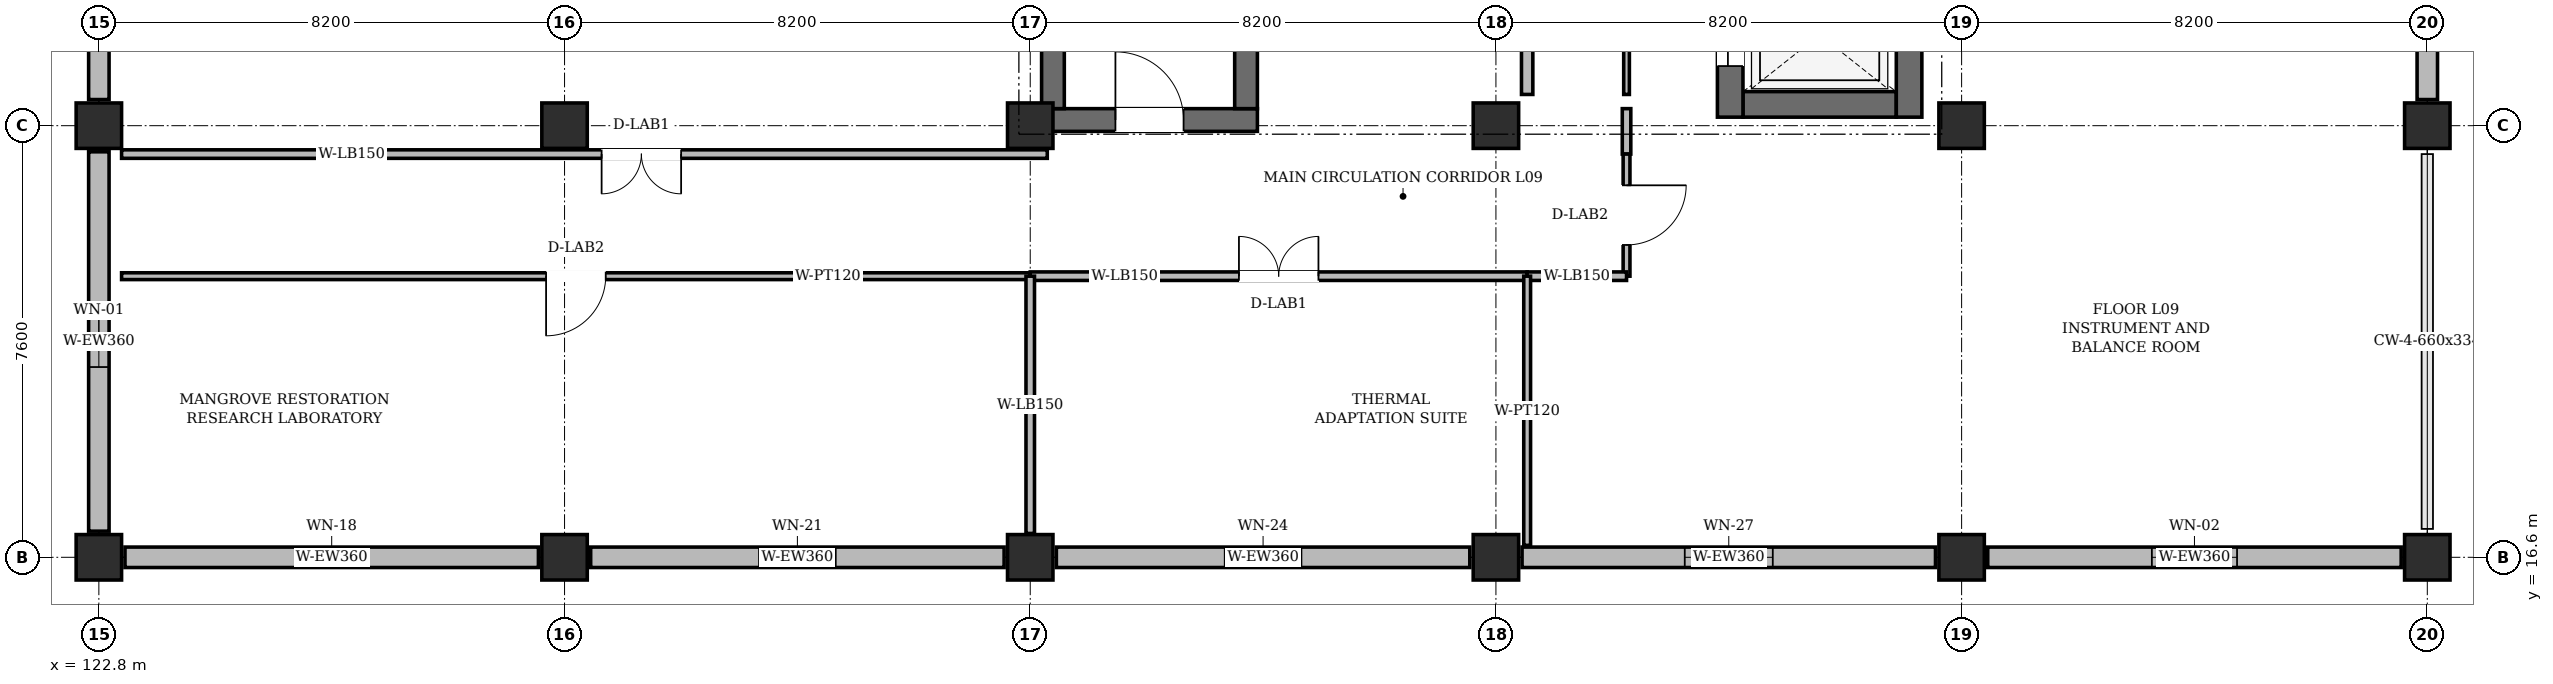
"""IFC4 building model, lengths in metres.
Left out: names, types, materials, properties, quantities, classifications, styles, units other than length and angle.
Written with IfcOpenShell. Run it as: python <this file> out.ifc"""

import sys

from ifc_helpers import new_model, si_unit, direction, frame, frame_2d, origin, origin_2d, place, context, subcontext, project, spatial, rectangle, extrude, element, fill, save


model = new_model("IFC4")
c1 = context("Model", 3, precision=1e-05, world=origin(), true_north=direction((0.0, 1.0)))
c2 = subcontext(c1, "Body", "Model", "MODEL_VIEW")
j1 = project(units=[si_unit("LENGTHUNIT", "METRE"), si_unit("PLANEANGLEUNIT", "RADIAN")], contexts=[c1])
p1 = place(None, origin())
s1 = spatial("IfcSite", under=j1, at=p1, CompositionType="ELEMENT")
p2 = place(p1, origin())
s2 = spatial("IfcBuilding", under=s1, at=p2, CompositionType="ELEMENT")
p3 = place(p2, frame((0.0, 0.0, 40.8)))
s3 = spatial("IfcBuildingStorey", under=s2, at=p3, CompositionType="ELEMENT", Elevation=40.8)
for number, where, z_axis, x_axis in (
    (1, (122.8, 16.6, 0.0), (0.0, 0.0, 1.0), (1.0, 0.0, 0.0)),
    (2, (122.8, 24.2, 0.0), (0.0, 0.0, 1.0), (1.0, 0.0, 0.0)),
    (3, (131.0, 16.6, 0.0), (0.0, 0.0, 1.0), (1.0, 0.0, 0.0)),
    (4, (131.0, 24.2, 0.0), (0.0, 0.0, 1.0), (1.0, 0.0, 0.0)),
    (5, (139.2, 16.6, 0.0), (0.0, 0.0, 1.0), (1.0, 0.0, 0.0)),
    (6, (139.2, 24.2, 0.0), (0.0, 0.0, 1.0), (1.0, 0.0, 0.0)),
    (7, (147.4, 16.6, 0.0), (0.0, 0.0, 1.0), (1.0, 0.0, 0.0)),
    (8, (147.4, 24.2, 0.0), (0.0, 0.0, 1.0), (1.0, 0.0, 0.0)),
    (9, (155.6, 16.6, 0.0), (0.0, 0.0, 1.0), (1.0, 0.0, 0.0)),
    (10, (155.6, 24.2, 0.0), (0.0, 0.0, 1.0), (1.0, 0.0, 0.0)),
    (11, (163.8, 16.6, 0.0), (0.0, 0.0, 1.0), (1.0, 0.0, 0.0)),
    (12, (163.8, 24.2, 0.0), (0.0, 0.0, 1.0), (1.0, 0.0, 0.0)),
):
    element("IfcColumn", number, at=place(p3, frame(where, z_axis=z_axis, x_axis=x_axis)), inside=s3, PredefinedType="COLUMN", context=c2, shape_type="SweptSolid", body=[
        extrude(rectangle(XDim=0.8, YDim=0.8, at=origin_2d()), origin(), (0.0, 0.0, 1.0), 3.94),
    ])
p4 = place(p3, frame((123.26, 16.6, 0.0), z_axis=(0.0, 0.0, 1.0), x_axis=(1.0, 0.0, 0.0)))
e13 = element("IfcWall", 13, at=p4, inside=s3, PredefinedType="SOLIDWALL", context=c2, shape_type="SweptSolid", body=[
    extrude(rectangle(XDim=7.28, YDim=0.36, at=frame_2d((3.64, 0.0))), origin(), (0.0, 0.0, 1.0), 3.325),
])
p5 = place(p4, frame((3.065, 0.0, 0.95)))
e14 = element("IfcOpeningElement", 14, at=p5, cuts=e13, PredefinedType="OPENING", context=c2, shape_type="SweptSolid", body=[
    extrude(rectangle(XDim=1.15, YDim=1.5, at=frame_2d((0.575, 0.75))), frame((0.0, 0.192, 0.0), z_axis=(0.0, -1.0, 0.0), x_axis=(1.0, 0.0, 0.0)), (0.0, 0.0, 1.0), 0.384),
])
p6 = place(p3, frame((131.46, 16.6, 0.0), z_axis=(0.0, 0.0, 1.0), x_axis=(1.0, 0.0, 0.0)))
e15 = element("IfcWall", 15, at=p6, inside=s3, PredefinedType="SOLIDWALL", context=c2, shape_type="SweptSolid", body=[
    extrude(rectangle(XDim=7.28, YDim=0.36, at=frame_2d((3.64, 0.0))), origin(), (0.0, 0.0, 1.0), 3.325),
])
p7 = place(p6, frame((2.965, 0.0, 0.95)))
e16 = element("IfcOpeningElement", 16, at=p7, cuts=e15, PredefinedType="OPENING", context=c2, shape_type="SweptSolid", body=[
    extrude(rectangle(XDim=1.35, YDim=1.25, at=frame_2d((0.675, 0.625))), frame((0.0, 0.192, 0.0), z_axis=(0.0, -1.0, 0.0), x_axis=(1.0, 0.0, 0.0)), (0.0, 0.0, 1.0), 0.384),
])
p8 = place(p3, frame((139.66, 16.6, 0.0), z_axis=(0.0, 0.0, 1.0), x_axis=(1.0, 0.0, 0.0)))
e17 = element("IfcWall", 17, at=p8, inside=s3, PredefinedType="SOLIDWALL", context=c2, shape_type="SweptSolid", body=[
    extrude(rectangle(XDim=7.28, YDim=0.36, at=frame_2d((3.64, 0.0))), origin(), (0.0, 0.0, 1.0), 3.325),
])
p9 = place(p8, frame((2.965, 0.0, 0.95)))
e18 = element("IfcOpeningElement", 18, at=p9, cuts=e17, PredefinedType="OPENING", context=c2, shape_type="SweptSolid", body=[
    extrude(rectangle(XDim=1.35, YDim=2.05, at=frame_2d((0.675, 1.025))), frame((0.0, 0.192, 0.0), z_axis=(0.0, -1.0, 0.0), x_axis=(1.0, 0.0, 0.0)), (0.0, 0.0, 1.0), 0.384),
])
p10 = place(p3, frame((147.86, 16.6, 0.0), z_axis=(0.0, 0.0, 1.0), x_axis=(1.0, 0.0, 0.0)))
e19 = element("IfcWall", 19, at=p10, inside=s3, PredefinedType="SOLIDWALL", context=c2, shape_type="SweptSolid", body=[
    extrude(rectangle(XDim=7.28, YDim=0.36, at=frame_2d((3.64, 0.0))), origin(), (0.0, 0.0, 1.0), 3.325),
])
p11 = place(p10, frame((2.865, 0.0, 0.95)))
e20 = element("IfcOpeningElement", 20, at=p11, cuts=e19, PredefinedType="OPENING", context=c2, shape_type="SweptSolid", body=[
    extrude(rectangle(XDim=1.55, YDim=1.75, at=frame_2d((0.775, 0.875))), frame((0.0, 0.192, 0.0), z_axis=(0.0, -1.0, 0.0), x_axis=(1.0, 0.0, 0.0)), (0.0, 0.0, 1.0), 0.384),
])
p12 = place(p3, frame((156.06, 16.6, 0.0), z_axis=(0.0, 0.0, 1.0), x_axis=(1.0, 0.0, 0.0)))
e21 = element("IfcWall", 21, at=p12, inside=s3, PredefinedType="SOLIDWALL", context=c2, shape_type="SweptSolid", body=[
    extrude(rectangle(XDim=7.28, YDim=0.36, at=frame_2d((3.64, 0.0))), origin(), (0.0, 0.0, 1.0), 3.325),
])
p13 = place(p12, frame((2.89, 0.0, 0.95)))
e22 = element("IfcOpeningElement", 22, at=p13, cuts=e21, PredefinedType="OPENING", context=c2, shape_type="SweptSolid", body=[
    extrude(rectangle(XDim=1.5, YDim=2.1, at=frame_2d((0.75, 1.05))), frame((0.0, 0.192, 0.0), z_axis=(0.0, -1.0, 0.0), x_axis=(1.0, 0.0, 0.0)), (0.0, 0.0, 1.0), 0.384),
])
p14 = place(p3, frame((163.8, 24.66, 0.0), z_axis=(0.0, 0.0, 1.0), x_axis=(0.0, 1.0, 0.0)))
e23 = element("IfcWall", 23, at=p14, inside=s3, PredefinedType="SOLIDWALL", context=c2, shape_type="SweptSolid", body=[
    extrude(rectangle(XDim=6.68, YDim=0.36, at=frame_2d((3.34, 0.0))), origin(), (0.0, 0.0, 1.0), 3.325),
])
p15 = place(p14, frame((2.665, 0.0, 0.95)))
e24 = element("IfcOpeningElement", 24, at=p15, cuts=e23, PredefinedType="OPENING", context=c2, shape_type="SweptSolid", body=[
    extrude(rectangle(XDim=1.35, YDim=1.5, at=frame_2d((0.675, 0.75))), frame((0.0, 0.192, 0.0), z_axis=(0.0, -1.0, 0.0), x_axis=(1.0, 0.0, 0.0)), (0.0, 0.0, 1.0), 0.384),
])
p16 = place(p3, frame((122.8, 31.34, 0.0), z_axis=(0.0, 0.0, 1.0), x_axis=(0.0, -1.0, 0.0)))
e25 = element("IfcWall", 25, at=p16, inside=s3, PredefinedType="SOLIDWALL", context=c2, shape_type="SweptSolid", body=[
    extrude(rectangle(XDim=6.68, YDim=0.36, at=frame_2d((3.34, 0.0))), origin(), (0.0, 0.0, 1.0), 3.325),
])
p17 = place(p16, frame((2.565, 0.0, 0.95)))
e26 = element("IfcOpeningElement", 26, at=p17, cuts=e25, PredefinedType="OPENING", context=c2, shape_type="SweptSolid", body=[
    extrude(rectangle(XDim=1.55, YDim=1.5, at=frame_2d((0.775, 0.75))), frame((0.0, 0.192, 0.0), z_axis=(0.0, -1.0, 0.0), x_axis=(1.0, 0.0, 0.0)), (0.0, 0.0, 1.0), 0.384),
])
p18 = place(p3, frame((122.8, 23.74, 0.0), z_axis=(0.0, 0.0, 1.0), x_axis=(0.0, -1.0, 0.0)))
e27 = element("IfcWall", 27, at=p18, inside=s3, PredefinedType="SOLIDWALL", context=c2, shape_type="SweptSolid", body=[
    extrude(rectangle(XDim=6.68, YDim=0.36, at=frame_2d((3.34, 0.0))), origin(), (0.0, 0.0, 1.0), 3.325),
])
p19 = place(p18, frame((2.89, 0.0, 0.95)))
e28 = element("IfcOpeningElement", 28, at=p19, cuts=e27, PredefinedType="OPENING", context=c2, shape_type="SweptSolid", body=[
    extrude(rectangle(XDim=0.9, YDim=2.1, at=frame_2d((0.45, 1.05))), frame((0.0, 0.192, 0.0), z_axis=(0.0, -1.0, 0.0), x_axis=(1.0, 0.0, 0.0)), (0.0, 0.0, 1.0), 0.384),
])
p20 = place(p3, frame((139.4, 24.3, 0.0), z_axis=(0.0, 0.0, 1.0), x_axis=(1.0, 0.0, 0.0)))
e29 = element("IfcWall", 29, at=p20, inside=s3, PredefinedType="SHEAR", context=c2, shape_type="SweptSolid", body=[
    extrude(rectangle(XDim=3.8, YDim=0.4, at=frame_2d((1.9, 0.0))), origin(), (0.0, 0.0, 1.0), 3.94),
])
p21 = place(p20, frame((1.3, 0.0, 0.0)))
e30 = element("IfcOpeningElement", 30, at=p21, cuts=e29, PredefinedType="OPENING", context=c2, shape_type="SweptSolid", body=[
    extrude(rectangle(XDim=1.2, YDim=2.2, at=frame_2d((0.6, 1.1))), frame((0.0, 0.212, 0.0), z_axis=(0.0, -1.0, 0.0), x_axis=(1.0, 0.0, 0.0)), (0.0, 0.0, 1.0), 0.424),
])
for number, where, z_axis, x_axis in (
    (31, (139.6, 24.5, 0.0), (0.0, 0.0, 1.0), (0.0, 1.0, 0.0)),
    (32, (143.0, 24.5, 0.0), (0.0, 0.0, 1.0), (0.0, 1.0, 0.0)),
):
    element("IfcWall", number, at=place(p3, frame(where, z_axis=z_axis, x_axis=x_axis)), inside=s3, PredefinedType="SHEAR", context=c2, shape_type="SweptSolid", body=[
        extrude(rectangle(XDim=7.0, YDim=0.4, at=frame_2d((3.5, 0.0))), origin(), (0.0, 0.0, 1.0), 3.94),
    ])
p22 = place(p3, frame((151.75, 24.575, 0.0), z_axis=(0.0, 0.0, 1.0), x_axis=(1.0, 0.0, 0.0)))
e33 = element("IfcWall", 33, at=p22, inside=s3, PredefinedType="SHEAR", context=c2, shape_type="SweptSolid", body=[
    extrude(rectangle(XDim=2.7, YDim=0.45, at=frame_2d((1.35, 0.0))), origin(), (0.0, 0.0, 1.0), 3.94),
])
p23 = place(p3, frame((151.525, 24.35, 0.0), z_axis=(0.0, 0.0, 1.0), x_axis=(0.0, 1.0, 0.0)))
e34 = element("IfcWall", 34, at=p23, inside=s3, PredefinedType="SHEAR", context=c2, shape_type="SweptSolid", body=[
    extrude(rectangle(XDim=2.9, YDim=0.45, at=frame_2d((1.45, 0.0))), origin(), (0.0, 0.0, 1.0), 3.94),
])
p24 = place(p23, frame((0.9, 0.0, 0.0)))
e35 = element("IfcOpeningElement", 35, at=p24, cuts=e34, PredefinedType="OPENING", context=c2, shape_type="SweptSolid", body=[
    extrude(rectangle(XDim=1.1, YDim=2.2, at=frame_2d((0.55, 1.1))), frame((0.0, 0.237, 0.0), z_axis=(0.0, -1.0, 0.0), x_axis=(1.0, 0.0, 0.0)), (0.0, 0.0, 1.0), 0.474),
])
p25 = place(p3, frame((154.675, 24.35, 0.0), z_axis=(0.0, 0.0, 1.0), x_axis=(0.0, 1.0, 0.0)))
e36 = element("IfcWall", 36, at=p25, inside=s3, PredefinedType="SHEAR", context=c2, shape_type="SweptSolid", body=[
    extrude(rectangle(XDim=2.9, YDim=0.45, at=frame_2d((1.45, 0.0))), origin(), (0.0, 0.0, 1.0), 3.94),
])
p26 = place(p3, frame((147.95, 31.75, 0.0), z_axis=(0.0, 0.0, 1.0), x_axis=(0.0, -1.0, 0.0)))
e37 = element("IfcWall", 37, at=p26, inside=s3, PredefinedType="PARTITIONING", context=c2, shape_type="SweptSolid", body=[
    extrude(rectangle(XDim=7.0, YDim=0.2, at=frame_2d((3.5, 0.0))), origin(), (0.0, 0.0, 1.0), 3.805),
])
p27 = place(p26, frame((2.75, 0.0, 0.0)))
e38 = element("IfcOpeningElement", 38, at=p27, cuts=e37, PredefinedType="OPENING", context=c2, shape_type="SweptSolid", body=[
    extrude(rectangle(XDim=1.5, YDim=2.2, at=frame_2d((0.75, 1.1))), frame((0.0, 0.112, 0.0), z_axis=(0.0, -1.0, 0.0), x_axis=(1.0, 0.0, 0.0)), (0.0, 0.0, 1.0), 0.224),
])
p28 = place(p3, frame((149.7, 24.75, 0.0), z_axis=(0.0, 0.0, 1.0), x_axis=(0.0, 1.0, 0.0)))
e39 = element("IfcWall", 39, at=p28, inside=s3, PredefinedType="PARTITIONING", context=c2, shape_type="SweptSolid", body=[
    extrude(rectangle(XDim=11.3, YDim=0.1, at=frame_2d((5.65, 0.0))), origin(), (0.0, 0.0, 1.0), 3.805),
])
p29 = place(p28, frame((4.75, 0.0, 0.0)))
e40 = element("IfcOpeningElement", 40, at=p29, cuts=e39, PredefinedType="OPENING", context=c2, shape_type="SweptSolid", body=[
    extrude(rectangle(XDim=1.8, YDim=2.4, at=frame_2d((0.9, 1.2))), frame((0.0, 0.062, 0.0), z_axis=(0.0, -1.0, 0.0), x_axis=(1.0, 0.0, 0.0)), (0.0, 0.0, 1.0), 0.124),
])
p30 = place(p3, frame((139.2, 21.55, 0.0), z_axis=(0.0, 0.0, 1.0), x_axis=(-1.0, 0.0, 0.0)))
e41 = element("IfcWall", 41, at=p30, inside=s3, PredefinedType="PARTITIONING", context=c2, shape_type="SweptSolid", body=[
    extrude(rectangle(XDim=16.0, YDim=0.12, at=frame_2d((8.0, 0.0))), origin(), (0.0, 0.0, 1.0), 3.585),
])
p31 = place(p30, frame((7.475, 0.0, 0.0)))
e42 = element("IfcOpeningElement", 42, at=p31, cuts=e41, PredefinedType="OPENING", context=c2, shape_type="SweptSolid", body=[
    extrude(rectangle(XDim=1.05, YDim=2.2, at=frame_2d((0.525, 1.1))), frame((0.0, 0.072, 0.0), z_axis=(0.0, -1.0, 0.0), x_axis=(1.0, 0.0, 0.0)), (0.0, 0.0, 1.0), 0.144),
])
p32 = place(p3, frame((147.95, 21.55, 0.0), z_axis=(0.0, 0.0, 1.0), x_axis=(-1.0, 0.0, 0.0)))
e43 = element("IfcWall", 43, at=p32, inside=s3, PredefinedType="PARTITIONING", context=c2, shape_type="SweptSolid", body=[
    extrude(rectangle(XDim=8.75, YDim=0.15, at=frame_2d((4.375, 0.0))), origin(), (0.0, 0.0, 1.0), 3.515),
])
p33 = place(p32, frame((3.675, 0.0, 0.0)))
e44 = element("IfcOpeningElement", 44, at=p33, cuts=e43, PredefinedType="OPENING", context=c2, shape_type="SweptSolid", body=[
    extrude(rectangle(XDim=1.4, YDim=2.2, at=frame_2d((0.7, 1.1))), frame((0.0, 0.087, 0.0), z_axis=(0.0, -1.0, 0.0), x_axis=(1.0, 0.0, 0.0)), (0.0, 0.0, 1.0), 0.174),
])
p34 = place(p3, frame((149.7, 24.5, 0.0), z_axis=(0.0, 0.0, 1.0), x_axis=(0.0, -1.0, 0.0)))
e45 = element("IfcWall", 45, at=p34, inside=s3, PredefinedType="PARTITIONING", context=c2, shape_type="SweptSolid", body=[
    extrude(rectangle(XDim=0.8, YDim=0.15, at=frame_2d((0.4, 0.0))), origin(), (0.0, 0.0, 1.0), 3.805),
])
p35 = place(p3, frame((149.7, 23.7, 0.0), z_axis=(0.0, 0.0, 1.0), x_axis=(0.0, -1.0, 0.0)))
e46 = element("IfcWall", 46, at=p35, inside=s3, PredefinedType="PARTITIONING", context=c2, shape_type="SweptSolid", body=[
    extrude(rectangle(XDim=2.15, YDim=0.12, at=frame_2d((1.075, 0.0))), origin(), (0.0, 0.0, 1.0), 3.805),
])
p36 = place(p35, frame((0.55, 0.0, 0.0)))
e47 = element("IfcOpeningElement", 47, at=p36, cuts=e46, PredefinedType="OPENING", context=c2, shape_type="SweptSolid", body=[
    extrude(rectangle(XDim=1.05, YDim=2.2, at=frame_2d((0.525, 1.1))), frame((0.0, 0.072, 0.0), z_axis=(0.0, -1.0, 0.0), x_axis=(1.0, 0.0, 0.0)), (0.0, 0.0, 1.0), 0.144),
])
p37 = place(p3, frame((149.7, 21.55, 0.0), z_axis=(0.0, 0.0, 1.0), x_axis=(-1.0, 0.0, 0.0)))
e48 = element("IfcWall", 48, at=p37, inside=s3, PredefinedType="PARTITIONING", context=c2, shape_type="SweptSolid", body=[
    extrude(rectangle(XDim=1.75, YDim=0.15, at=frame_2d((0.875, 0.0))), origin(), (0.0, 0.0, 1.0), 3.515),
])
p38 = place(p3, frame((123.2, 23.7, 0.0), z_axis=(0.0, 0.0, 1.0), x_axis=(1.0, 0.0, 0.0)))
e49 = element("IfcWall", 49, at=p38, inside=s3, PredefinedType="PARTITIONING", context=c2, shape_type="SweptSolid", body=[
    extrude(rectangle(XDim=16.3, YDim=0.15, at=frame_2d((8.15, 0.0))), origin(), (0.0, 0.0, 1.0), 3.805),
])
p39 = place(p38, frame((8.453, 0.0, 0.0)))
e50 = element("IfcOpeningElement", 50, at=p39, cuts=e49, PredefinedType="OPENING", context=c2, shape_type="SweptSolid", body=[
    extrude(rectangle(XDim=1.4, YDim=2.2, at=frame_2d((0.7, 1.1))), frame((0.0, 0.087, 0.0), z_axis=(0.0, -1.0, 0.0), x_axis=(1.0, 0.0, 0.0)), (0.0, 0.0, 1.0), 0.174),
])
p40 = place(p3, frame((139.2, 21.55, 0.0), z_axis=(0.0, 0.0, 1.0), x_axis=(0.0, -1.0, 0.0)))
e51 = element("IfcWall", 51, at=p40, inside=s3, PredefinedType="PARTITIONING", context=c2, shape_type="SweptSolid", body=[
    extrude(rectangle(XDim=4.53, YDim=0.15, at=frame_2d((2.265, 0.0))), origin(), (0.0, 0.0, 1.0), 3.275),
])
p41 = place(p3, frame((147.95, 21.55, 0.0), z_axis=(0.0, 0.0, 1.0), x_axis=(0.0, -1.0, 0.0)))
e52 = element("IfcWall", 52, at=p41, inside=s3, PredefinedType="PARTITIONING", context=c2, shape_type="SweptSolid", body=[
    extrude(rectangle(XDim=4.74, YDim=0.12, at=frame_2d((2.37, 0.0))), origin(), (0.0, 0.0, 1.0), 3.805),
])
p42 = place(p5, origin())
e53 = element("IfcWindow", 53, at=p42, inside=s3, PartitioningType="SINGLE_PANEL", PredefinedType="WINDOW", context=c2, shape_type="SweptSolid", body=[
    extrude(rectangle(XDim=1.15, YDim=1.5, at=frame_2d((0.575, 0.75))), frame((0.0, 0.03, 0.0), z_axis=(0.0, -1.0, 0.0), x_axis=(1.0, 0.0, 0.0)), (0.0, 0.0, 1.0), 0.06),
])
fill(e14, e53)
p43 = place(p7, origin())
e54 = element("IfcWindow", 54, at=p43, inside=s3, PartitioningType="SINGLE_PANEL", PredefinedType="WINDOW", context=c2, shape_type="SweptSolid", body=[
    extrude(rectangle(XDim=1.35, YDim=1.25, at=frame_2d((0.675, 0.625))), frame((0.0, 0.03, 0.0), z_axis=(0.0, -1.0, 0.0), x_axis=(1.0, 0.0, 0.0)), (0.0, 0.0, 1.0), 0.06),
])
fill(e16, e54)
p44 = place(p9, origin())
e55 = element("IfcWindow", 55, at=p44, inside=s3, PartitioningType="SINGLE_PANEL", PredefinedType="WINDOW", context=c2, shape_type="SweptSolid", body=[
    extrude(rectangle(XDim=1.35, YDim=2.05, at=frame_2d((0.675, 1.025))), frame((0.0, 0.03, 0.0), z_axis=(0.0, -1.0, 0.0), x_axis=(1.0, 0.0, 0.0)), (0.0, 0.0, 1.0), 0.06),
])
fill(e18, e55)
p45 = place(p11, origin())
e56 = element("IfcWindow", 56, at=p45, inside=s3, PartitioningType="DOUBLE_PANEL_VERTICAL", PredefinedType="WINDOW", context=c2, shape_type="SweptSolid", body=[
    extrude(rectangle(XDim=1.55, YDim=1.75, at=frame_2d((0.775, 0.875))), frame((0.0, 0.03, 0.0), z_axis=(0.0, -1.0, 0.0), x_axis=(1.0, 0.0, 0.0)), (0.0, 0.0, 1.0), 0.06),
])
fill(e20, e56)
p46 = place(p13, origin())
e57 = element("IfcWindow", 57, at=p46, inside=s3, PartitioningType="DOUBLE_PANEL_VERTICAL", PredefinedType="WINDOW", context=c2, shape_type="SweptSolid", body=[
    extrude(rectangle(XDim=1.5, YDim=2.1, at=frame_2d((0.75, 1.05))), frame((0.0, 0.03, 0.0), z_axis=(0.0, -1.0, 0.0), x_axis=(1.0, 0.0, 0.0)), (0.0, 0.0, 1.0), 0.06),
])
fill(e22, e57)
p47 = place(p19, origin())
e58 = element("IfcWindow", 58, at=p47, inside=s3, PartitioningType="SINGLE_PANEL", PredefinedType="WINDOW", context=c2, shape_type="SweptSolid", body=[
    extrude(rectangle(XDim=0.9, YDim=2.1, at=frame_2d((0.45, 1.05))), frame((0.0, 0.03, 0.0), z_axis=(0.0, -1.0, 0.0), x_axis=(1.0, 0.0, 0.0)), (0.0, 0.0, 1.0), 0.06),
])
fill(e28, e58)
p48 = place(p21, origin())
e59 = element("IfcDoor", 59, at=p48, inside=s3, OperationType="SINGLE_SWING_LEFT", PredefinedType="DOOR", context=c2, shape_type="SweptSolid", body=[
    extrude(rectangle(XDim=1.2, YDim=2.2, at=frame_2d((0.6, 1.1))), frame((0.0, 0.025, 0.0), z_axis=(0.0, -1.0, 0.0), x_axis=(1.0, 0.0, 0.0)), (0.0, 0.0, 1.0), 0.05),
])
fill(e30, e59)
p49 = place(p24, origin())
e60 = element("IfcDoor", 60, at=p49, inside=s3, OperationType="DOUBLE_DOOR_SLIDING", PredefinedType="DOOR", context=c2, shape_type="SweptSolid", body=[
    extrude(rectangle(XDim=1.1, YDim=2.2, at=frame_2d((0.55, 1.1))), frame((0.0, 0.025, 0.0), z_axis=(0.0, -1.0, 0.0), x_axis=(1.0, 0.0, 0.0)), (0.0, 0.0, 1.0), 0.05),
])
fill(e35, e60)
p50 = place(p31, origin())
e61 = element("IfcDoor", 61, at=p50, inside=s3, OperationType="SINGLE_SWING_RIGHT", PredefinedType="DOOR", context=c2, shape_type="SweptSolid", body=[
    extrude(rectangle(XDim=1.05, YDim=2.2, at=frame_2d((0.525, 1.1))), frame((0.0, 0.025, 0.0), z_axis=(0.0, -1.0, 0.0), x_axis=(1.0, 0.0, 0.0)), (0.0, 0.0, 1.0), 0.05),
])
fill(e42, e61)
p51 = place(p33, frame((1.4, 0.0, 0.0), z_axis=(0.0, 0.0, 1.0), x_axis=(-1.0, 0.0, 0.0)))
e62 = element("IfcDoor", 62, at=p51, inside=s3, OperationType="DOUBLE_DOOR_SINGLE_SWING", PredefinedType="DOOR", context=c2, shape_type="SweptSolid", body=[
    extrude(rectangle(XDim=1.4, YDim=2.2, at=frame_2d((0.7, 1.1))), frame((0.0, 0.025, 0.0), z_axis=(0.0, -1.0, 0.0), x_axis=(1.0, 0.0, 0.0)), (0.0, 0.0, 1.0), 0.05),
])
fill(e44, e62)
p52 = place(p36, origin())
e63 = element("IfcDoor", 63, at=p52, inside=s3, OperationType="SINGLE_SWING_LEFT", PredefinedType="DOOR", context=c2, shape_type="SweptSolid", body=[
    extrude(rectangle(XDim=1.05, YDim=2.2, at=frame_2d((0.525, 1.1))), frame((0.0, 0.025, 0.0), z_axis=(0.0, -1.0, 0.0), x_axis=(1.0, 0.0, 0.0)), (0.0, 0.0, 1.0), 0.05),
])
fill(e47, e63)
p53 = place(p39, frame((1.4, 0.0, 0.0), z_axis=(0.0, 0.0, 1.0), x_axis=(-1.0, 0.0, 0.0)))
e64 = element("IfcDoor", 64, at=p53, inside=s3, OperationType="DOUBLE_DOOR_SINGLE_SWING", PredefinedType="DOOR", context=c2, shape_type="SweptSolid", body=[
    extrude(rectangle(XDim=1.4, YDim=2.2, at=frame_2d((0.7, 1.1))), frame((0.0, 0.025, 0.0), z_axis=(0.0, -1.0, 0.0), x_axis=(1.0, 0.0, 0.0)), (0.0, 0.0, 1.0), 0.05),
])
fill(e50, e64)
save(model, sys.argv[1])
